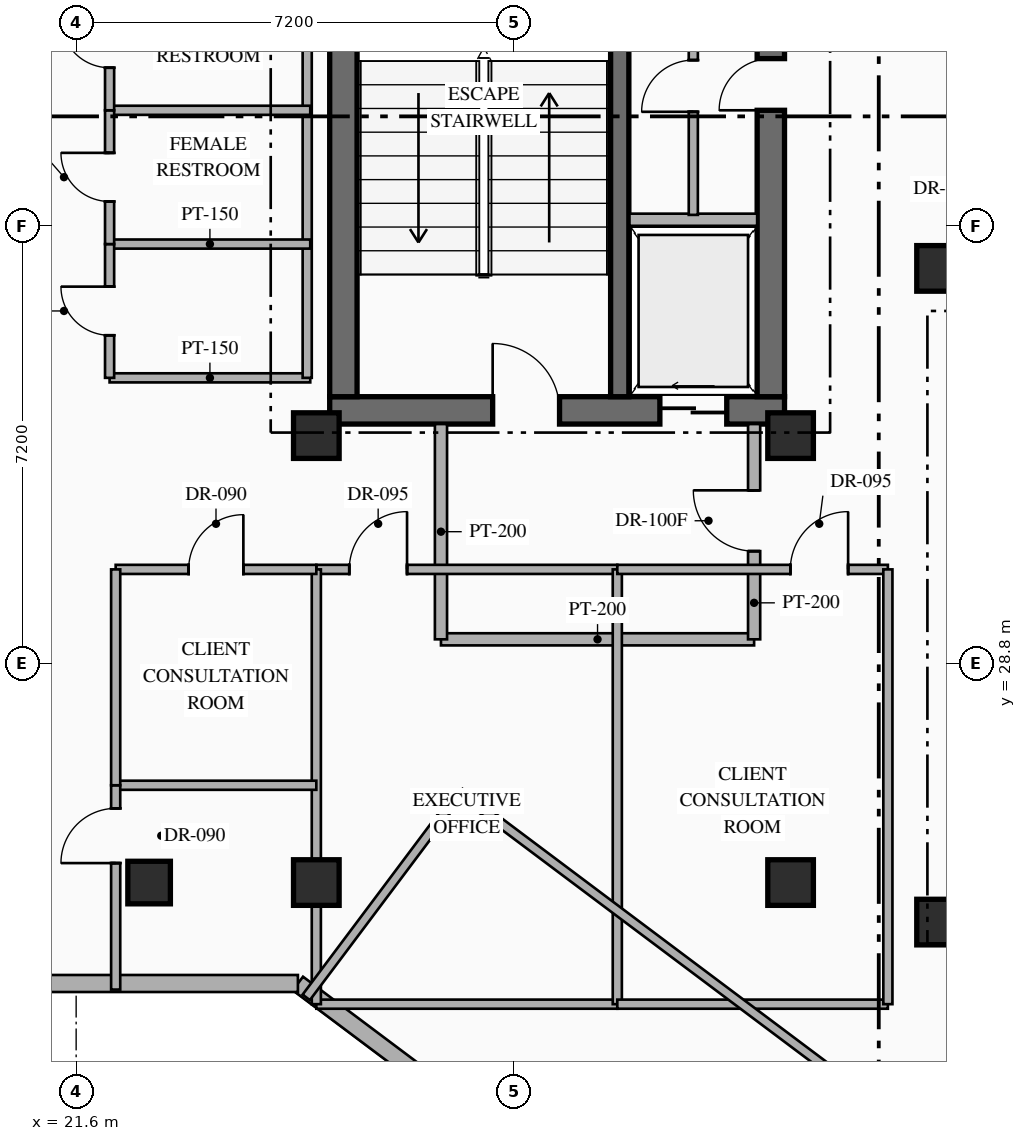
"""IFC4 building model, lengths in metres.
Left out: names, types, materials, properties, quantities, classifications, styles, units other than length and angle.
Written with IfcOpenShell. Run it as: python <this file> out.ifc"""

import sys

from ifc_helpers import new_model, si_unit, direction, frame, frame_2d, origin, origin_2d, place, context, subcontext, project, spatial, rectangle, hollow_rectangle, extrude, element, fill, save


model = new_model("IFC4")
c1 = context("Model", 3, precision=1e-05, world=origin(), true_north=direction((0.0, 1.0)))
c2 = subcontext(c1, "Body", "Model", "MODEL_VIEW")
j1 = project(units=[si_unit("LENGTHUNIT", "METRE"), si_unit("PLANEANGLEUNIT", "RADIAN")], contexts=[c1])
p1 = place(None, origin())
s1 = spatial("IfcSite", under=j1, at=p1, CompositionType="ELEMENT")
p2 = place(p1, origin())
s2 = spatial("IfcBuilding", under=s1, at=p2, CompositionType="ELEMENT")
p3 = place(p2, frame((0.0, 0.0, 209.55)))
s3 = spatial("IfcBuildingStorey", under=s2, at=p3, CompositionType="ELEMENT", Elevation=209.55)
p4 = place(p3, frame((25.77, 32.965, 0.0), z_axis=(0.0, 0.0, 1.0), x_axis=(1.0, 0.0, 0.0)))
e1 = element("IfcWall", 1, at=p4, inside=s3, PredefinedType="SHEAR", context=c2, shape_type="SweptSolid", body=[
    extrude(rectangle(XDim=7.48, YDim=0.45, at=frame_2d((3.74, 0.0))), origin(), (0.0, 0.0, 1.0), 3.6),
])
p5 = place(p4, frame((2.68, 0.0, 0.0)))
e2 = element("IfcOpeningElement", 2, at=p5, cuts=e1, PredefinedType="OPENING", context=c2, shape_type="SweptSolid", body=[
    extrude(rectangle(XDim=1.1, YDim=2.2, at=frame_2d((0.55, 1.1))), frame((0.0, 0.235, 0.0), z_axis=(0.0, -1.0, 0.0), x_axis=(1.0, 0.0, 0.0)), (0.0, 0.0, 1.0), 0.47),
])
p6 = place(p4, frame((5.43, 0.0, 0.0)))
e3 = element("IfcOpeningElement", 3, at=p6, cuts=e1, PredefinedType="OPENING", context=c2, shape_type="SweptSolid", body=[
    extrude(rectangle(XDim=1.1, YDim=2.15, at=frame_2d((0.55, 1.075))), frame((0.0, 0.235, 0.0), z_axis=(0.0, -1.0, 0.0), x_axis=(1.0, 0.0, 0.0)), (0.0, 0.0, 1.0), 0.47),
])
p7 = place(p3, frame((25.995, 33.19, 0.0), z_axis=(0.0, 0.0, 1.0), x_axis=(0.0, 1.0, 0.0)))
e4 = element("IfcWall", 4, at=p7, inside=s3, PredefinedType="SHEAR", context=c2, shape_type="SweptSolid", body=[
    extrude(rectangle(XDim=9.48, YDim=0.45, at=frame_2d((4.74, 0.0))), origin(), (0.0, 0.0, 1.0), 3.6),
])
p8 = place(p3, frame((33.025, 33.19, 0.0), z_axis=(0.0, 0.0, 1.0), x_axis=(0.0, 1.0, 0.0)))
e5 = element("IfcWall", 5, at=p8, inside=s3, PredefinedType="SHEAR", context=c2, shape_type="SweptSolid", body=[
    extrude(rectangle(XDim=9.48, YDim=0.45, at=frame_2d((4.74, 0.0))), origin(), (0.0, 0.0, 1.0), 3.6),
])
p9 = place(p8, frame((4.71, 0.0, 0.0)))
e6 = element("IfcOpeningElement", 6, at=p9, cuts=e5, PredefinedType="OPENING", context=c2, shape_type="SweptSolid", body=[
    extrude(rectangle(XDim=0.85, YDim=2.08, at=frame_2d((0.425, 1.04))), frame((0.0, 0.235, 0.0), z_axis=(0.0, -1.0, 0.0), x_axis=(1.0, 0.0, 0.0)), (0.0, 0.0, 1.0), 0.47),
])
p10 = place(p8, frame((7.76, 0.0, 0.0)))
e7 = element("IfcOpeningElement", 7, at=p10, cuts=e5, PredefinedType="OPENING", context=c2, shape_type="SweptSolid", body=[
    extrude(rectangle(XDim=0.85, YDim=2.08, at=frame_2d((0.425, 1.04))), frame((0.0, 0.235, 0.0), z_axis=(0.0, -1.0, 0.0), x_axis=(1.0, 0.0, 0.0)), (0.0, 0.0, 1.0), 0.47),
])
p11 = place(p3, frame((30.54, 33.19, 0.0), z_axis=(0.0, 0.0, 1.0), x_axis=(0.0, 1.0, 0.0)))
e8 = element("IfcWall", 8, at=p11, inside=s3, PredefinedType="SHEAR", context=c2, shape_type="SweptSolid", body=[
    extrude(rectangle(XDim=9.48, YDim=0.3, at=frame_2d((4.74, 0.0))), origin(), (0.0, 0.0, 1.0), 3.6),
])
for number, where, z_axis, x_axis in (
    (9, (25.55, 32.55, 0.0), (0.0, 0.0, 1.0), (1.0, 0.0, 0.0)),
    (10, (33.35, 32.55, 0.0), (0.0, 0.0, 1.0), (1.0, 0.0, 0.0)),
    (11, (35.8, 24.55, 0.0), (0.0, 0.0, 1.0), (1.0, 0.0, 0.0)),
    (12, (35.8, 35.3, 0.0), (0.0, 0.0, 1.0), (1.0, 0.0, 0.0)),
    (13, (25.55, 25.2, 0.0), (0.0, 0.0, 1.0), (1.0, 0.0, 0.0)),
    (14, (33.35, 25.2, 0.0), (0.0, 0.0, 1.0), (1.0, 0.0, 0.0)),
):
    element("IfcColumn", number, at=place(p3, frame(where, z_axis=z_axis, x_axis=x_axis)), inside=s3, PredefinedType="COLUMN", context=c2, shape_type="SweptSolid", body=[
        extrude(hollow_rectangle(XDim=0.75, YDim=0.75, WallThickness=0.028, at=origin_2d()), origin(), (0.0, 0.0, 1.0), 3.6),
    ])
p12 = place(p3, frame((22.8, 25.2, 0.0), z_axis=(0.0, 0.0, 1.0), x_axis=(1.0, 0.0, 0.0)))
e15 = element("IfcColumn", 15, at=p12, inside=s3, PredefinedType="COLUMN", context=c2, shape_type="SweptSolid", body=[
    extrude(hollow_rectangle(XDim=0.7, YDim=0.7, WallThickness=0.028, at=origin_2d()), origin(), (0.0, 0.0, 1.0), 3.6),
])
p13 = place(p3, frame((44.918, 8.787, 0.0), z_axis=(0.0, 0.0, 1.0), x_axis=(-0.800004765927, 0.599993645378, 0.0)))
e16 = element("IfcWall", 16, at=p13, inside=s3, PredefinedType="STANDARD", context=c2, shape_type="SweptSolid", body=[
    extrude(rectangle(XDim=24.588, YDim=0.28, at=frame_2d((12.294, 0.0))), origin(), (0.0, 0.0, 1.0), 3.35),
])
p14 = place(p3, frame((25.247, 23.54, 0.0), z_axis=(0.0, 0.0, 1.0), x_axis=(-1.0, 0.0, 0.0)))
e17 = element("IfcWall", 17, at=p14, inside=s3, PredefinedType="STANDARD", context=c2, shape_type="SweptSolid", body=[
    extrude(rectangle(XDim=4.789, YDim=0.28, at=frame_2d((2.395, 0.0))), origin(), (0.0, 0.0, 1.0), 3.35),
])
p15 = place(p3, frame((30.7, 36.1, 0.0), z_axis=(0.0, 0.0, 1.0), x_axis=(1.0, 0.0, 0.0)))
e18 = element("IfcWall", 18, at=p15, inside=s3, PredefinedType="STANDARD", context=c2, shape_type="SweptSolid", body=[
    extrude(rectangle(XDim=2.1, YDim=0.2, at=frame_2d((1.05, 0.0))), origin(), (0.0, 0.0, 1.0), 3.35),
])
p16 = place(p3, frame((31.75, 36.18, 0.0), z_axis=(0.0, 0.0, 1.0), x_axis=(0.0, 1.0, 0.0)))
e19 = element("IfcWall", 19, at=p16, inside=s3, PredefinedType="PARTITIONING", context=c2, shape_type="SweptSolid", body=[
    extrude(rectangle(XDim=4.24, YDim=0.15, at=frame_2d((2.12, 0.0))), origin(), (0.0, 0.0, 1.0), 3.35),
])
p17 = place(p16, frame((1.695, 0.0, 0.0)))
e20 = element("IfcOpeningElement", 20, at=p17, cuts=e19, PredefinedType="OPENING", context=c2, shape_type="SweptSolid", body=[
    extrude(rectangle(XDim=0.85, YDim=2.08, at=frame_2d((0.425, 1.04))), frame((0.0, 0.085, 0.0), z_axis=(0.0, -1.0, 0.0), x_axis=(1.0, 0.0, 0.0)), (0.0, 0.0, 1.0), 0.17),
])
p18 = place(p3, frame((27.6, 29.2, 0.0), z_axis=(0.0, 0.0, 1.0), x_axis=(1.0, 0.0, 0.0)))
e21 = element("IfcWall", 21, at=p18, inside=s3, PredefinedType="STANDARD", context=c2, shape_type="SweptSolid", body=[
    extrude(rectangle(XDim=5.15, YDim=0.2, at=frame_2d((2.575, 0.0))), origin(), (0.0, 0.0, 1.0), 3.35),
])
p19 = place(p3, frame((27.6, 29.2, 0.0), z_axis=(0.0, 0.0, 1.0), x_axis=(0.0, 1.0, 0.0)))
e22 = element("IfcWall", 22, at=p19, inside=s3, PredefinedType="STANDARD", context=c2, shape_type="SweptSolid", body=[
    extrude(rectangle(XDim=3.54, YDim=0.2, at=frame_2d((1.77, 0.0))), origin(), (0.0, 0.0, 1.0), 3.35),
])
p20 = place(p3, frame((32.75, 29.2, 0.0), z_axis=(0.0, 0.0, 1.0), x_axis=(0.0, 1.0, 0.0)))
e23 = element("IfcWall", 23, at=p20, inside=s3, PredefinedType="STANDARD", context=c2, shape_type="SweptSolid", body=[
    extrude(rectangle(XDim=3.54, YDim=0.2, at=frame_2d((1.77, 0.0))), origin(), (0.0, 0.0, 1.0), 3.35),
])
p21 = place(p20, frame((1.45, 0.0, 0.0)))
e24 = element("IfcOpeningElement", 24, at=p21, cuts=e23, PredefinedType="OPENING", context=c2, shape_type="SweptSolid", body=[
    extrude(rectangle(XDim=1.0, YDim=2.2, at=frame_2d((0.5, 1.1))), frame((0.0, 0.11, 0.0), z_axis=(0.0, -1.0, 0.0), x_axis=(1.0, 0.0, 0.0)), (0.0, 0.0, 1.0), 0.22),
])
p22 = place(p3, frame((22.15, 33.5, 0.0), z_axis=(0.0, 0.0, 1.0), x_axis=(1.0, 0.0, 0.0)))
e25 = element("IfcWall", 25, at=p22, inside=s3, PredefinedType="PARTITIONING", context=c2, shape_type="SweptSolid", body=[
    extrude(rectangle(XDim=3.3, YDim=0.15, at=frame_2d((1.65, 0.0))), origin(), (0.0, 0.0, 1.0), 3.35),
])
p23 = place(p3, frame((25.4, 33.5, 0.0), z_axis=(0.0, 0.0, 1.0), x_axis=(0.0, 1.0, 0.0)))
e26 = element("IfcWall", 26, at=p23, inside=s3, PredefinedType="PARTITIONING", context=c2, shape_type="SweptSolid", body=[
    extrude(rectangle(XDim=6.6, YDim=0.15, at=frame_2d((3.3, 0.0))), origin(), (0.0, 0.0, 1.0), 3.35),
])
for number, where, z_axis, x_axis in (
    (27, (22.15, 35.7, 0.0), (0.0, 0.0, 1.0), (1.0, 0.0, 0.0)),
    (28, (22.15, 37.9, 0.0), (0.0, 0.0, 1.0), (1.0, 0.0, 0.0)),
):
    element("IfcWall", number, at=place(p3, frame(where, z_axis=z_axis, x_axis=x_axis)), inside=s3, PredefinedType="PARTITIONING", context=c2, shape_type="SweptSolid", body=[
        extrude(rectangle(XDim=3.3, YDim=0.15, at=frame_2d((1.65, 0.0))), origin(), (0.0, 0.0, 1.0), 3.35),
    ])
p24 = place(p3, frame((22.15, 33.5, 0.0), z_axis=(0.0, 0.0, 1.0), x_axis=(0.0, 1.0, 0.0)))
e29 = element("IfcWall", 29, at=p24, inside=s3, PredefinedType="PARTITIONING", context=c2, shape_type="SweptSolid", body=[
    extrude(rectangle(XDim=2.2, YDim=0.15, at=frame_2d((1.1, 0.0))), origin(), (0.0, 0.0, 1.0), 3.35),
])
p25 = place(p24, frame((0.7, 0.0, 0.0)))
e30 = element("IfcOpeningElement", 30, at=p25, cuts=e29, PredefinedType="OPENING", context=c2, shape_type="SweptSolid", body=[
    extrude(rectangle(XDim=0.8, YDim=2.06, at=frame_2d((0.4, 1.03))), frame((0.0, 0.085, 0.0), z_axis=(0.0, -1.0, 0.0), x_axis=(1.0, 0.0, 0.0)), (0.0, 0.0, 1.0), 0.17),
])
p26 = place(p3, frame((22.15, 35.7, 0.0), z_axis=(0.0, 0.0, 1.0), x_axis=(0.0, 1.0, 0.0)))
e31 = element("IfcWall", 31, at=p26, inside=s3, PredefinedType="PARTITIONING", context=c2, shape_type="SweptSolid", body=[
    extrude(rectangle(XDim=2.2, YDim=0.15, at=frame_2d((1.1, 0.0))), origin(), (0.0, 0.0, 1.0), 3.35),
])
p27 = place(p26, frame((0.7, 0.0, 0.0)))
e32 = element("IfcOpeningElement", 32, at=p27, cuts=e31, PredefinedType="OPENING", context=c2, shape_type="SweptSolid", body=[
    extrude(rectangle(XDim=0.8, YDim=2.06, at=frame_2d((0.4, 1.03))), frame((0.0, 0.085, 0.0), z_axis=(0.0, -1.0, 0.0), x_axis=(1.0, 0.0, 0.0)), (0.0, 0.0, 1.0), 0.17),
])
p28 = place(p3, frame((22.15, 37.9, 0.0), z_axis=(0.0, 0.0, 1.0), x_axis=(0.0, 1.0, 0.0)))
e33 = element("IfcWall", 33, at=p28, inside=s3, PredefinedType="PARTITIONING", context=c2, shape_type="SweptSolid", body=[
    extrude(rectangle(XDim=2.2, YDim=0.15, at=frame_2d((1.1, 0.0))), origin(), (0.0, 0.0, 1.0), 3.35),
])
p29 = place(p28, frame((0.7, 0.0, 0.0)))
e34 = element("IfcOpeningElement", 34, at=p29, cuts=e33, PredefinedType="OPENING", context=c2, shape_type="SweptSolid", body=[
    extrude(rectangle(XDim=0.8, YDim=2.06, at=frame_2d((0.4, 1.03))), frame((0.0, 0.085, 0.0), z_axis=(0.0, -1.0, 0.0), x_axis=(1.0, 0.0, 0.0)), (0.0, 0.0, 1.0), 0.17),
])
p30 = place(p3, frame((25.55, 23.2, 0.0), z_axis=(0.0, 0.0, 1.0), x_axis=(1.0, 0.0, 0.0)))
e35 = element("IfcWall", 35, at=p30, inside=s3, PredefinedType="PARTITIONING", context=c2, shape_type="SweptSolid", body=[
    extrude(rectangle(XDim=4.95, YDim=0.15, at=frame_2d((2.475, 0.0))), origin(), (0.0, 0.0, 1.0), 3.35),
])
p31 = place(p3, frame((25.55, 30.35, 0.0), z_axis=(0.0, 0.0, 1.0), x_axis=(1.0, 0.0, 0.0)))
e36 = element("IfcWall", 36, at=p31, inside=s3, PredefinedType="PARTITIONING", context=c2, shape_type="SweptSolid", body=[
    extrude(rectangle(XDim=4.95, YDim=0.15, at=frame_2d((2.475, 0.0))), origin(), (0.0, 0.0, 1.0), 3.35),
])
p32 = place(p31, frame((0.542, 0.0, 0.0)))
e37 = element("IfcOpeningElement", 37, at=p32, cuts=e36, PredefinedType="OPENING", context=c2, shape_type="SweptSolid", body=[
    extrude(rectangle(XDim=0.95, YDim=2.15, at=frame_2d((0.475, 1.075))), frame((0.0, 0.085, 0.0), z_axis=(0.0, -1.0, 0.0), x_axis=(1.0, 0.0, 0.0)), (0.0, 0.0, 1.0), 0.17),
])
p33 = place(p3, frame((25.55, 23.2, 0.0), z_axis=(0.0, 0.0, 1.0), x_axis=(0.0, 1.0, 0.0)))
e38 = element("IfcWall", 38, at=p33, inside=s3, PredefinedType="PARTITIONING", context=c2, shape_type="SweptSolid", body=[
    extrude(rectangle(XDim=7.15, YDim=0.15, at=frame_2d((3.575, 0.0))), origin(), (0.0, 0.0, 1.0), 2.757),
])
p34 = place(p3, frame((30.5, 23.2, 0.0), z_axis=(0.0, 0.0, 1.0), x_axis=(0.0, 1.0, 0.0)))
e39 = element("IfcWall", 39, at=p34, inside=s3, PredefinedType="PARTITIONING", context=c2, shape_type="SweptSolid", body=[
    extrude(rectangle(XDim=7.15, YDim=0.15, at=frame_2d((3.575, 0.0))), origin(), (0.0, 0.0, 1.0), 3.35),
])
p35 = place(p3, frame((30.5, 23.2, 0.0), z_axis=(0.0, 0.0, 1.0), x_axis=(1.0, 0.0, 0.0)))
e40 = element("IfcWall", 40, at=p35, inside=s3, PredefinedType="PARTITIONING", context=c2, shape_type="SweptSolid", body=[
    extrude(rectangle(XDim=4.45, YDim=0.15, at=frame_2d((2.225, 0.0))), origin(), (0.0, 0.0, 1.0), 3.35),
])
p36 = place(p3, frame((30.5, 30.35, 0.0), z_axis=(0.0, 0.0, 1.0), x_axis=(1.0, 0.0, 0.0)))
e41 = element("IfcWall", 41, at=p36, inside=s3, PredefinedType="PARTITIONING", context=c2, shape_type="SweptSolid", body=[
    extrude(rectangle(XDim=4.45, YDim=0.15, at=frame_2d((2.225, 0.0))), origin(), (0.0, 0.0, 1.0), 3.35),
])
p37 = place(p36, frame((2.846, 0.0, 0.0)))
e42 = element("IfcOpeningElement", 42, at=p37, cuts=e41, PredefinedType="OPENING", context=c2, shape_type="SweptSolid", body=[
    extrude(rectangle(XDim=0.95, YDim=2.15, at=frame_2d((0.475, 1.075))), frame((0.0, 0.085, 0.0), z_axis=(0.0, -1.0, 0.0), x_axis=(1.0, 0.0, 0.0)), (0.0, 0.0, 1.0), 0.17),
])
p38 = place(p3, frame((34.95, 23.2, 0.0), z_axis=(0.0, 0.0, 1.0), x_axis=(0.0, 1.0, 0.0)))
e43 = element("IfcWall", 43, at=p38, inside=s3, PredefinedType="PARTITIONING", context=c2, shape_type="SweptSolid", body=[
    extrude(rectangle(XDim=7.15, YDim=0.15, at=frame_2d((3.575, 0.0))), origin(), (0.0, 0.0, 1.0), 3.35),
])
p39 = place(p3, frame((22.25, 26.8, 0.0), z_axis=(0.0, 0.0, 1.0), x_axis=(1.0, 0.0, 0.0)))
e44 = element("IfcWall", 44, at=p39, inside=s3, PredefinedType="PARTITIONING", context=c2, shape_type="SweptSolid", body=[
    extrude(rectangle(XDim=3.3, YDim=0.15, at=frame_2d((1.65, 0.0))), origin(), (0.0, 0.0, 1.0), 3.35),
])
p40 = place(p3, frame((22.25, 23.44, 0.0), z_axis=(0.0, 0.0, 1.0), x_axis=(0.0, 1.0, 0.0)))
e45 = element("IfcWall", 45, at=p40, inside=s3, PredefinedType="PARTITIONING", context=c2, shape_type="SweptSolid", body=[
    extrude(rectangle(XDim=3.36, YDim=0.15, at=frame_2d((1.68, 0.0))), origin(), (0.0, 0.0, 1.0), 3.35),
])
p41 = place(p40, frame((2.08, 0.0, 0.0)))
e46 = element("IfcOpeningElement", 46, at=p41, cuts=e45, PredefinedType="OPENING", context=c2, shape_type="SweptSolid", body=[
    extrude(rectangle(XDim=0.9, YDim=2.15, at=frame_2d((0.45, 1.075))), frame((0.0, 0.085, 0.0), z_axis=(0.0, -1.0, 0.0), x_axis=(1.0, 0.0, 0.0)), (0.0, 0.0, 1.0), 0.17),
])
p42 = place(p3, frame((22.25, 30.35, 0.0), z_axis=(0.0, 0.0, 1.0), x_axis=(1.0, 0.0, 0.0)))
e47 = element("IfcWall", 47, at=p42, inside=s3, PredefinedType="PARTITIONING", context=c2, shape_type="SweptSolid", body=[
    extrude(rectangle(XDim=3.3, YDim=0.15, at=frame_2d((1.65, 0.0))), origin(), (0.0, 0.0, 1.0), 3.35),
])
p43 = place(p42, frame((1.2, 0.0, 0.0)))
e48 = element("IfcOpeningElement", 48, at=p43, cuts=e47, PredefinedType="OPENING", context=c2, shape_type="SweptSolid", body=[
    extrude(rectangle(XDim=0.9, YDim=2.15, at=frame_2d((0.45, 1.075))), frame((0.0, 0.085, 0.0), z_axis=(0.0, -1.0, 0.0), x_axis=(1.0, 0.0, 0.0)), (0.0, 0.0, 1.0), 0.17),
])
p44 = place(p3, frame((22.25, 26.8, 0.0), z_axis=(0.0, 0.0, 1.0), x_axis=(0.0, 1.0, 0.0)))
e49 = element("IfcWall", 49, at=p44, inside=s3, PredefinedType="PARTITIONING", context=c2, shape_type="SweptSolid", body=[
    extrude(rectangle(XDim=3.55, YDim=0.15, at=frame_2d((1.775, 0.0))), origin(), (0.0, 0.0, 1.0), 3.35),
])
p45 = place(p3, frame((27.91, 26.68, 0.0), z_axis=(0.0, 0.0, 1.0), x_axis=(0.800005938517, -0.599992081896, 0.0)))
e50 = element("IfcWall", 50, at=p45, inside=s3, PredefinedType="PARTITIONING", context=c2, shape_type="SweptSolid", body=[
    extrude(rectangle(XDim=14.8, YDim=0.15, at=frame_2d((7.4, 0.0))), origin(), (0.0, 0.0, 1.0), 3.35),
])
p46 = place(p45, frame((9.281, 0.0, 0.0)))
e51 = element("IfcOpeningElement", 51, at=p46, cuts=e50, PredefinedType="OPENING", context=c2, shape_type="SweptSolid", body=[
    extrude(rectangle(XDim=0.95, YDim=2.15, at=frame_2d((0.475, 1.075))), frame((0.0, 0.085, 0.0), z_axis=(0.0, -1.0, 0.0), x_axis=(1.0, 0.0, 0.0)), (0.0, 0.0, 1.0), 0.17),
])
p47 = place(p3, frame((25.384, 23.312, 0.0), z_axis=(0.0, 0.0, 1.0), x_axis=(0.599990721155, 0.80000695905, 0.0)))
e52 = element("IfcWall", 52, at=p47, inside=s3, PredefinedType="PARTITIONING", context=c2, shape_type="SweptSolid", body=[
    extrude(rectangle(XDim=4.21, YDim=0.15, at=frame_2d((2.105, 0.0))), origin(), (0.0, 0.0, 1.0), 3.35),
])
p48 = place(p5, origin())
e53 = element("IfcDoor", 53, at=p48, inside=s3, OperationType="SINGLE_SWING_LEFT", PredefinedType="DOOR", context=c2, shape_type="SweptSolid", body=[
    extrude(rectangle(XDim=1.1, YDim=2.2, at=frame_2d((0.55, 1.1))), frame((0.0, 0.025, 0.0), z_axis=(0.0, -1.0, 0.0), x_axis=(1.0, 0.0, 0.0)), (0.0, 0.0, 1.0), 0.05),
])
fill(e2, e53)
p49 = place(p6, origin())
e54 = element("IfcDoor", 54, at=p49, inside=s3, OperationType="SLIDING_TO_LEFT", PredefinedType="USERDEFINED", context=c2, shape_type="SweptSolid", body=[
    extrude(rectangle(XDim=1.1, YDim=2.15, at=frame_2d((0.55, 1.075))), frame((0.0, 0.025, 0.0), z_axis=(0.0, -1.0, 0.0), x_axis=(1.0, 0.0, 0.0)), (0.0, 0.0, 1.0), 0.05),
])
fill(e3, e54)
p50 = place(p9, origin())
e55 = element("IfcDoor", 55, at=p50, inside=s3, OperationType="SINGLE_SWING_LEFT", PredefinedType="DOOR", context=c2, shape_type="SweptSolid", body=[
    extrude(rectangle(XDim=0.85, YDim=2.08, at=frame_2d((0.425, 1.04))), frame((0.0, 0.025, 0.0), z_axis=(0.0, -1.0, 0.0), x_axis=(1.0, 0.0, 0.0)), (0.0, 0.0, 1.0), 0.05),
])
fill(e6, e55)
p51 = place(p17, origin())
e56 = element("IfcDoor", 56, at=p51, inside=s3, OperationType="SINGLE_SWING_LEFT", PredefinedType="DOOR", context=c2, shape_type="SweptSolid", body=[
    extrude(rectangle(XDim=0.85, YDim=2.08, at=frame_2d((0.425, 1.04))), frame((0.0, 0.025, 0.0), z_axis=(0.0, -1.0, 0.0), x_axis=(1.0, 0.0, 0.0)), (0.0, 0.0, 1.0), 0.05),
])
fill(e20, e56)
p52 = place(p21, origin())
e57 = element("IfcDoor", 57, at=p52, inside=s3, OperationType="SINGLE_SWING_RIGHT", PredefinedType="DOOR", context=c2, shape_type="SweptSolid", body=[
    extrude(rectangle(XDim=1.0, YDim=2.2, at=frame_2d((0.5, 1.1))), frame((0.0, 0.025, 0.0), z_axis=(0.0, -1.0, 0.0), x_axis=(1.0, 0.0, 0.0)), (0.0, 0.0, 1.0), 0.05),
])
fill(e24, e57)
p53 = place(p25, origin())
e58 = element("IfcDoor", 58, at=p53, inside=s3, OperationType="SINGLE_SWING_RIGHT", PredefinedType="DOOR", context=c2, shape_type="SweptSolid", body=[
    extrude(rectangle(XDim=0.8, YDim=2.06, at=frame_2d((0.4, 1.03))), frame((0.0, 0.025, 0.0), z_axis=(0.0, -1.0, 0.0), x_axis=(1.0, 0.0, 0.0)), (0.0, 0.0, 1.0), 0.05),
])
fill(e30, e58)
p54 = place(p27, origin())
e59 = element("IfcDoor", 59, at=p54, inside=s3, OperationType="SINGLE_SWING_RIGHT", PredefinedType="DOOR", context=c2, shape_type="SweptSolid", body=[
    extrude(rectangle(XDim=0.8, YDim=2.06, at=frame_2d((0.4, 1.03))), frame((0.0, 0.025, 0.0), z_axis=(0.0, -1.0, 0.0), x_axis=(1.0, 0.0, 0.0)), (0.0, 0.0, 1.0), 0.05),
])
fill(e32, e59)
p55 = place(p29, origin())
e60 = element("IfcDoor", 60, at=p55, inside=s3, OperationType="SINGLE_SWING_RIGHT", PredefinedType="DOOR", context=c2, shape_type="SweptSolid", body=[
    extrude(rectangle(XDim=0.8, YDim=2.06, at=frame_2d((0.4, 1.03))), frame((0.0, 0.025, 0.0), z_axis=(0.0, -1.0, 0.0), x_axis=(1.0, 0.0, 0.0)), (0.0, 0.0, 1.0), 0.05),
])
fill(e34, e60)
p56 = place(p32, origin())
e61 = element("IfcDoor", 61, at=p56, inside=s3, OperationType="SINGLE_SWING_RIGHT", PredefinedType="DOOR", context=c2, shape_type="SweptSolid", body=[
    extrude(rectangle(XDim=0.95, YDim=2.15, at=frame_2d((0.475, 1.075))), frame((0.0, 0.025, 0.0), z_axis=(0.0, -1.0, 0.0), x_axis=(1.0, 0.0, 0.0)), (0.0, 0.0, 1.0), 0.05),
])
fill(e37, e61)
p57 = place(p37, origin())
e62 = element("IfcDoor", 62, at=p57, inside=s3, OperationType="SINGLE_SWING_RIGHT", PredefinedType="DOOR", context=c2, shape_type="SweptSolid", body=[
    extrude(rectangle(XDim=0.95, YDim=2.15, at=frame_2d((0.475, 1.075))), frame((0.0, 0.025, 0.0), z_axis=(0.0, -1.0, 0.0), x_axis=(1.0, 0.0, 0.0)), (0.0, 0.0, 1.0), 0.05),
])
fill(e42, e62)
p58 = place(p41, origin())
e63 = element("IfcDoor", 63, at=p58, inside=s3, OperationType="SINGLE_SWING_LEFT", PredefinedType="DOOR", context=c2, shape_type="SweptSolid", body=[
    extrude(rectangle(XDim=0.9, YDim=2.15, at=frame_2d((0.45, 1.075))), frame((0.0, 0.025, 0.0), z_axis=(0.0, -1.0, 0.0), x_axis=(1.0, 0.0, 0.0)), (0.0, 0.0, 1.0), 0.05),
])
fill(e46, e63)
p59 = place(p43, origin())
e64 = element("IfcDoor", 64, at=p59, inside=s3, OperationType="SINGLE_SWING_RIGHT", PredefinedType="DOOR", context=c2, shape_type="SweptSolid", body=[
    extrude(rectangle(XDim=0.9, YDim=2.15, at=frame_2d((0.45, 1.075))), frame((0.0, 0.025, 0.0), z_axis=(0.0, -1.0, 0.0), x_axis=(1.0, 0.0, 0.0)), (0.0, 0.0, 1.0), 0.05),
])
fill(e48, e64)
save(model, sys.argv[1])
